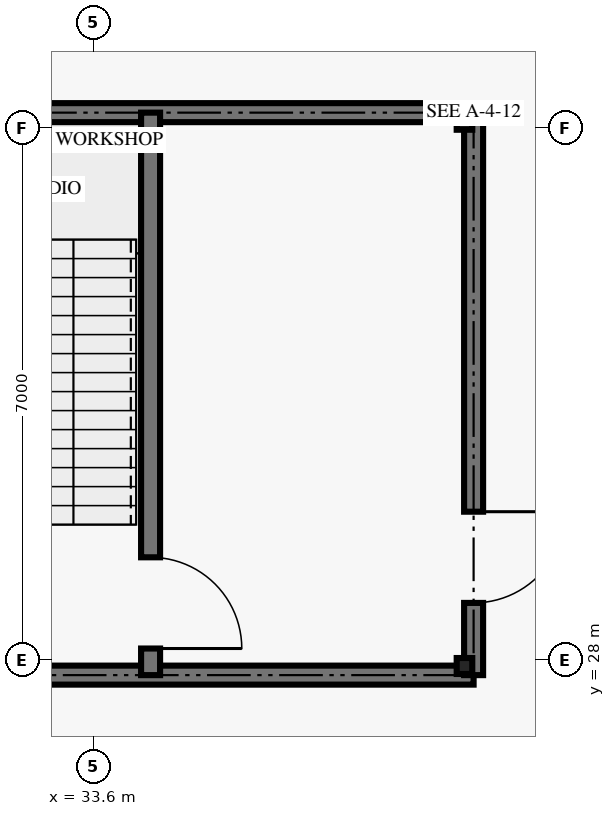
"""IFC4 building model, lengths in metres.
Left out: names, types, materials, properties, quantities, classifications, styles, units other than length and angle.
Written with IfcOpenShell. Run it as: python <this file> out.ifc"""

import sys

from ifc_helpers import new_model, si_unit, direction, frame, frame_2d, origin, origin_2d, place, context, subcontext, project, spatial, rectangle, i_section, extrude, element, fill, save


model = new_model("IFC4")
c1 = context("Model", 3, precision=1e-05, world=origin(), true_north=direction((0.0, 1.0)))
c2 = subcontext(c1, "Body", "Model", "MODEL_VIEW")
j1 = project(units=[si_unit("LENGTHUNIT", "METRE"), si_unit("PLANEANGLEUNIT", "RADIAN")], contexts=[c1])
p1 = place(None, origin())
s1 = spatial("IfcSite", under=j1, at=p1, CompositionType="ELEMENT")
p2 = place(p1, origin())
s2 = spatial("IfcBuilding", under=s1, at=p2, CompositionType="ELEMENT")
p3 = place(p2, origin())
s3 = spatial("IfcBuildingStorey", under=s2, at=p3, CompositionType="ELEMENT", Elevation=0.0)
for number, where, z_axis, x_axis in (
    (1, (38.48, 27.92, 0.0), (0.0, 0.0, 1.0), (1.0, 0.0, 0.0)),
    (2, (38.48, 35.08, 0.0), (0.0, 0.0, 1.0), (1.0, 0.0, 0.0)),
):
    element("IfcColumn", number, at=place(p3, frame(where, z_axis=z_axis, x_axis=x_axis)), inside=s3, PredefinedType="COLUMN", context=c2, shape_type="SweptSolid", body=[
        extrude(i_section(OverallWidth=0.205, OverallDepth=0.21, WebThickness=0.009, FlangeThickness=0.014, FilletRadius=0.01, at=origin_2d()), origin(), (0.0, 0.0, 1.0), 5.4),
    ])
for number, where, z_axis, x_axis in (
    (3, (29.4, 35.2, 0.0), (0.0, 0.0, 1.0), (1.0, 0.0, 0.0)),
    (4, (38.6, 27.8, 0.0), (0.0, 0.0, 1.0), (-1.0, 0.0, 0.0)),
):
    element("IfcWall", number, at=place(p3, frame(where, z_axis=z_axis, x_axis=x_axis)), inside=s3, PredefinedType="SHEAR", context=c2, shape_type="SweptSolid", body=[
        extrude(rectangle(XDim=9.2, YDim=0.25, at=frame_2d((4.6, 0.0))), origin(), (0.0, 0.0, 1.0), 5.16),
    ])
p4 = place(p3, frame((38.6, 35.2, 0.0), z_axis=(0.0, 0.0, 1.0), x_axis=(0.0, -1.0, 0.0)))
e5 = element("IfcWall", 5, at=p4, inside=s3, PredefinedType="SHEAR", context=c2, shape_type="SweptSolid", body=[
    extrude(rectangle(XDim=7.4, YDim=0.25, at=frame_2d((3.7, 0.0))), origin(), (0.0, 0.0, 1.0), 5.16),
])
p5 = place(p4, frame((5.25, 0.0, 0.0)))
e6 = element("IfcOpeningElement", 6, at=p5, cuts=e5, PredefinedType="OPENING", context=c2, shape_type="SweptSolid", body=[
    extrude(rectangle(XDim=1.2, YDim=2.2, at=frame_2d((0.6, 1.1))), frame((0.0, 0.135, 0.0), z_axis=(0.0, -1.0, 0.0), x_axis=(1.0, 0.0, 0.0)), (0.0, 0.0, 1.0), 0.27),
])
p6 = place(p3, frame((34.35, 35.2, 0.0), z_axis=(0.0, 0.0, 1.0), x_axis=(0.0, -1.0, 0.0)))
e7 = element("IfcWall", 7, at=p6, inside=s3, PredefinedType="SHEAR", context=c2, shape_type="SweptSolid", body=[
    extrude(rectangle(XDim=7.4, YDim=0.25, at=frame_2d((3.7, 0.0))), origin(), (0.0, 0.0, 1.0), 5.16),
])
p7 = place(p6, frame((5.85, 0.0, 0.0)))
e8 = element("IfcOpeningElement", 8, at=p7, cuts=e7, PredefinedType="OPENING", context=c2, shape_type="SweptSolid", body=[
    extrude(rectangle(XDim=1.2, YDim=2.2, at=frame_2d((0.6, 1.1))), frame((0.0, 0.135, 0.0), z_axis=(0.0, -1.0, 0.0), x_axis=(1.0, 0.0, 0.0)), (0.0, 0.0, 1.0), 0.27),
])
p8 = place(p5, origin())
e9 = element("IfcDoor", 9, at=p8, inside=s3, OperationType="SINGLE_SWING_LEFT", PredefinedType="DOOR", context=c2, shape_type="SweptSolid", body=[
    extrude(rectangle(XDim=1.2, YDim=2.2, at=frame_2d((0.6, 1.1))), frame((0.0, 0.025, 0.0), z_axis=(0.0, -1.0, 0.0), x_axis=(1.0, 0.0, 0.0)), (0.0, 0.0, 1.0), 0.05),
])
fill(e6, e9)
p9 = place(p7, origin())
e10 = element("IfcDoor", 10, at=p9, inside=s3, OperationType="SINGLE_SWING_RIGHT", PredefinedType="DOOR", context=c2, shape_type="SweptSolid", body=[
    extrude(rectangle(XDim=1.2, YDim=2.2, at=frame_2d((0.6, 1.1))), frame((0.0, 0.025, 0.0), z_axis=(0.0, -1.0, 0.0), x_axis=(1.0, 0.0, 0.0)), (0.0, 0.0, 1.0), 0.05),
])
fill(e8, e10)
save(model, sys.argv[1])
